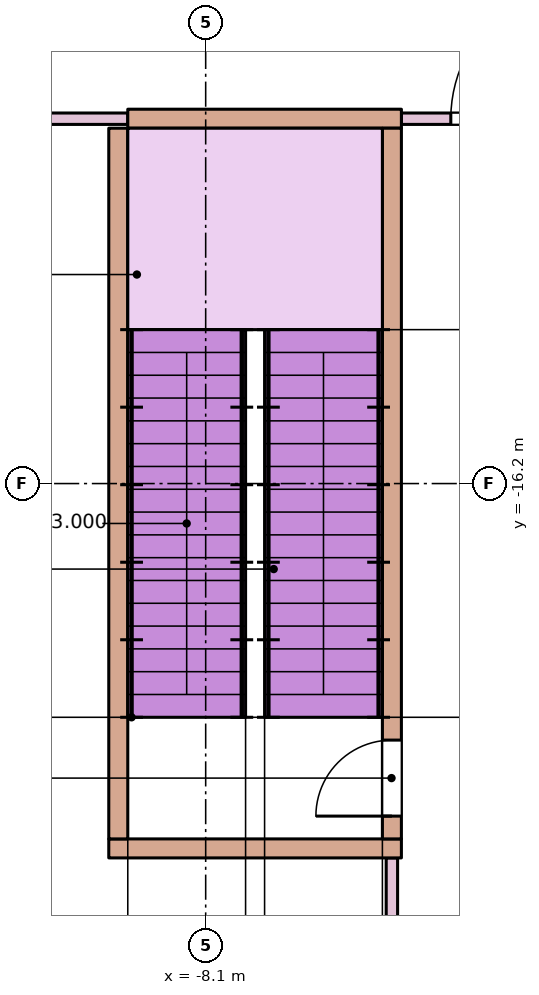
"""IFC4 building model, lengths in metres.
Left out: names, types, materials, properties, quantities, classifications, styles, units other than length and angle.
Written with IfcOpenShell. Run it as: python <this file> out.ifc"""

import sys

from ifc_helpers import new_model, si_unit, direction, frame, frame_2d, origin, place, context, subcontext, project, spatial, rectangle, extrude, element, fill, save


model = new_model("IFC4")
c1 = context("Model", 3, precision=1e-05, world=origin(), true_north=direction((0.0, 1.0)))
c2 = subcontext(c1, "Body", "Model", "MODEL_VIEW")
j1 = project(units=[si_unit("LENGTHUNIT", "METRE"), si_unit("PLANEANGLEUNIT", "RADIAN")], contexts=[c1])
p1 = place(None, origin())
s1 = spatial("IfcSite", under=j1, at=p1, CompositionType="ELEMENT")
p2 = place(p1, origin())
s2 = spatial("IfcBuilding", under=s1, at=p2, CompositionType="ELEMENT")
p3 = place(p2, origin())
s3 = spatial("IfcBuildingStorey", under=s2, at=p3, CompositionType="ELEMENT", Elevation=0.0)
p4 = place(p3, frame((-9.125, -11.4, 0.0), z_axis=(0.0, 0.0, 1.0), x_axis=(1.0, 0.0, 0.0)))
e1 = element("IfcWall", 1, at=p4, inside=s3, PredefinedType="STANDARD", context=c2, shape_type="SweptSolid", body=[
    extrude(rectangle(XDim=3.6, YDim=0.25, at=frame_2d((1.8, 0.0))), origin(), (0.0, 0.0, 1.0), 5.68),
])
p5 = place(p3, frame((-9.375, -21.0, 0.0), z_axis=(0.0, 0.0, 1.0), x_axis=(1.0, 0.0, 0.0)))
e2 = element("IfcWall", 2, at=p5, inside=s3, PredefinedType="STANDARD", context=c2, shape_type="SweptSolid", body=[
    extrude(rectangle(XDim=3.85, YDim=0.25, at=frame_2d((1.925, 0.0))), origin(), (0.0, 0.0, 1.0), 5.68),
])
p6 = place(p3, frame((-9.25, -20.875, 0.0), z_axis=(0.0, 0.0, 1.0), x_axis=(0.0, 1.0, 0.0)))
e3 = element("IfcWall", 3, at=p6, inside=s3, PredefinedType="STANDARD", context=c2, shape_type="SweptSolid", body=[
    extrude(rectangle(XDim=9.35, YDim=0.25, at=frame_2d((4.675, 0.0))), origin(), (0.0, 0.0, 1.0), 5.68),
])
p7 = place(p3, frame((-5.65, -20.875, 0.0), z_axis=(0.0, 0.0, 1.0), x_axis=(0.0, 1.0, 0.0)))
e4 = element("IfcWall", 4, at=p7, inside=s3, PredefinedType="STANDARD", context=c2, shape_type="SweptSolid", body=[
    extrude(rectangle(XDim=9.35, YDim=0.25, at=frame_2d((4.675, 0.0))), origin(), (0.0, 0.0, 1.0), 5.68),
])
p8 = place(p7, frame((0.3, 0.0, 0.0)))
e5 = element("IfcOpeningElement", 5, at=p8, cuts=e4, PredefinedType="OPENING", context=c2, shape_type="SweptSolid", body=[
    extrude(rectangle(XDim=1.0, YDim=2.1, at=frame_2d((0.5, 1.05))), frame((0.0, 0.135, 0.0), z_axis=(0.0, -1.0, 0.0), x_axis=(1.0, 0.0, 0.0)), (0.0, 0.0, 1.0), 0.27),
])
p9 = place(p3, frame((-13.275, -11.4, 0.0), z_axis=(0.0, 0.0, 1.0), x_axis=(1.0, 0.0, 0.0)))
e6 = element("IfcWall", 6, at=p9, inside=s3, PredefinedType="PARTITIONING", context=c2, shape_type="SweptSolid", body=[
    extrude(rectangle(XDim=4.15, YDim=0.15, at=frame_2d((2.075, 0.0))), origin(), (0.0, 0.0, 1.0), 5.68),
])
p10 = place(p9, frame((1.15, 0.0, 0.0)))
e7 = element("IfcOpeningElement", 7, at=p10, cuts=e6, PredefinedType="OPENING", context=c2, shape_type="SweptSolid", body=[
    extrude(rectangle(XDim=1.8, YDim=2.4, at=frame_2d((0.9, 1.2))), frame((0.0, 0.085, 0.0), z_axis=(0.0, -1.0, 0.0), x_axis=(1.0, 0.0, 0.0)), (0.0, 0.0, 1.0), 0.17),
])
p11 = place(p3, frame((-5.525, -11.4, 0.0), z_axis=(0.0, 0.0, 1.0), x_axis=(1.0, 0.0, 0.0)))
e8 = element("IfcWall", 8, at=p11, inside=s3, PredefinedType="PARTITIONING", context=c2, shape_type="SweptSolid", body=[
    extrude(rectangle(XDim=3.2, YDim=0.15, at=frame_2d((1.6, 0.0))), origin(), (0.0, 0.0, 1.0), 5.68),
])
p12 = place(p11, frame((0.65, 0.0, 0.0)))
e9 = element("IfcOpeningElement", 9, at=p12, cuts=e8, PredefinedType="OPENING", context=c2, shape_type="SweptSolid", body=[
    extrude(rectangle(XDim=1.8, YDim=2.4, at=frame_2d((0.9, 1.2))), frame((0.0, 0.085, 0.0), z_axis=(0.0, -1.0, 0.0), x_axis=(1.0, 0.0, 0.0)), (0.0, 0.0, 1.0), 0.17),
])
p13 = place(p3, frame((-5.65, -23.925, 0.0), z_axis=(0.0, 0.0, 1.0), x_axis=(0.0, 1.0, 0.0)))
e10 = element("IfcWall", 10, at=p13, inside=s3, PredefinedType="PARTITIONING", context=c2, shape_type="SweptSolid", body=[
    extrude(rectangle(XDim=2.8, YDim=0.15, at=frame_2d((1.4, 0.0))), origin(), (0.0, 0.0, 1.0), 5.68),
])
p14 = place(p8, origin())
e11 = element("IfcDoor", 11, at=p14, inside=s3, OperationType="SINGLE_SWING_LEFT", PredefinedType="DOOR", context=c2, shape_type="SweptSolid", body=[
    extrude(rectangle(XDim=1.0, YDim=2.1, at=frame_2d((0.5, 1.05))), frame((0.0, 0.025, 0.0), z_axis=(0.0, -1.0, 0.0), x_axis=(1.0, 0.0, 0.0)), (0.0, 0.0, 1.0), 0.05),
])
fill(e5, e11)
p15 = place(p12, frame((1.8, 0.0, 0.0), z_axis=(0.0, 0.0, 1.0), x_axis=(-1.0, 0.0, 0.0)))
e12 = element("IfcDoor", 12, at=p15, inside=s3, OperationType="SINGLE_SWING_RIGHT", PredefinedType="DOOR", context=c2, shape_type="SweptSolid", body=[
    extrude(rectangle(XDim=1.8, YDim=2.4, at=frame_2d((0.9, 1.2))), frame((0.0, 0.025, 0.0), z_axis=(0.0, -1.0, 0.0), x_axis=(1.0, 0.0, 0.0)), (0.0, 0.0, 1.0), 0.05),
])
fill(e9, e12)
save(model, sys.argv[1])
